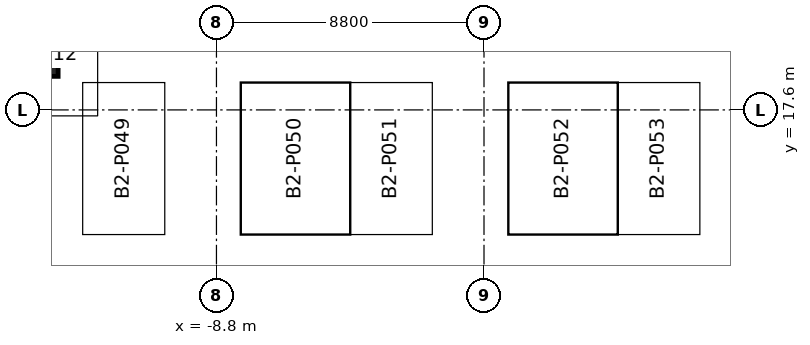
"""IFC4 building model, lengths in metres.
Left out: names, types, materials, properties, quantities, classifications, styles, units other than length and angle.
Written with IfcOpenShell. Run it as: python <this file> out.ifc"""

import sys

from ifc_helpers import new_model, si_unit, direction, frame, origin, origin_2d, place, context, subcontext, project, spatial, rectangle, extrude, element, save


model = new_model("IFC4")
c1 = context("Model", 3, precision=1e-05, world=origin(), true_north=direction((0.0, 1.0)))
c2 = subcontext(c1, "Body", "Model", "MODEL_VIEW")
j1 = project(units=[si_unit("LENGTHUNIT", "METRE"), si_unit("PLANEANGLEUNIT", "RADIAN")], contexts=[c1])
p1 = place(None, origin())
s1 = spatial("IfcSite", under=j1, at=p1, CompositionType="ELEMENT")
p2 = place(p1, origin())
s2 = spatial("IfcBuilding", under=s1, at=p2, CompositionType="ELEMENT")
p3 = place(p2, frame((0.0, 0.0, -9.0)))
s3 = spatial("IfcBuildingStorey", under=s2, at=p3, CompositionType="ELEMENT", Elevation=-9.0)
p4 = place(p3, frame((-14.708, 19.404, 0.0), z_axis=(0.0, 0.0, 1.0), x_axis=(0.555816910562, 0.8313047347, 0.0)))
e1 = element("IfcColumn", 1, at=p4, inside=s3, PredefinedType="COLUMN", context=c2, shape_type="SweptSolid", body=[
    extrude(rectangle(XDim=1.4, YDim=1.4, at=origin_2d()), origin(), (0.0, 0.0, 1.0), 4.5),
])
save(model, sys.argv[1])
